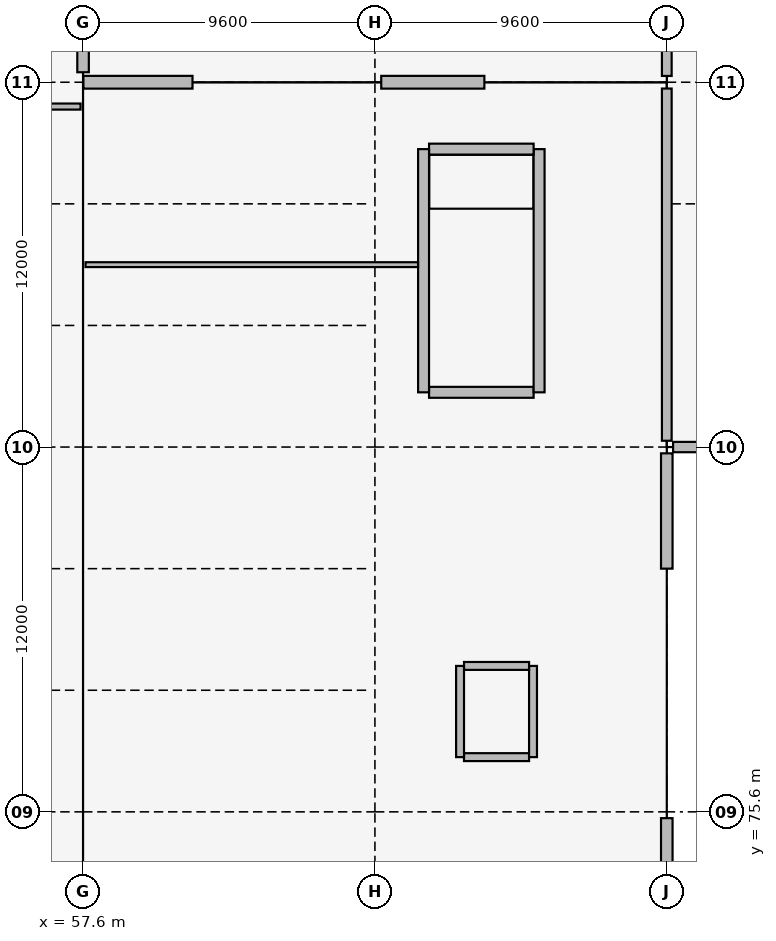
"""IFC4 building model, lengths in metres.
Left out: names, types, materials, properties, quantities, classifications, styles, units other than length and angle.
Written with IfcOpenShell. Run it as: python <this file> out.ifc"""

import sys

from ifc_helpers import new_model, si_unit, direction, frame, frame_2d, origin, origin_2d, place, context, subcontext, project, spatial, rectangle, hollow_circle, i_section, extrude, element, fill, save


model = new_model("IFC4")
c1 = context("Model", 3, precision=1e-05, world=origin(), true_north=direction((0.0, 1.0)))
c2 = subcontext(c1, "Body", "Model", "MODEL_VIEW")
j1 = project(units=[si_unit("LENGTHUNIT", "METRE"), si_unit("PLANEANGLEUNIT", "RADIAN")], contexts=[c1])
p1 = place(None, origin())
s1 = spatial("IfcSite", under=j1, at=p1, CompositionType="ELEMENT")
p2 = place(p1, origin())
s2 = spatial("IfcBuilding", under=s1, at=p2, CompositionType="ELEMENT")
p3 = place(p2, origin())
s3 = spatial("IfcBuildingStorey", under=s2, at=p3, CompositionType="ELEMENT", Elevation=0.0)
for number, where, z_axis, x_axis in (
    (1, (57.6, 75.6, 0.0), (0.0, 0.0, 1.0), (1.0, 0.0, 0.0)),
    (2, (57.6, 87.6, 0.0), (0.0, 0.0, 1.0), (1.0, 0.0, 0.0)),
    (3, (57.6, 99.6, 0.0), (0.0, 0.0, 1.0), (1.0, 0.0, 0.0)),
):
    element("IfcColumn", number, at=place(p3, frame(where, z_axis=z_axis, x_axis=x_axis)), inside=s3, PredefinedType="COLUMN", context=c2, shape_type="SweptSolid", body=[
        extrude(i_section(OverallWidth=0.3, OverallDepth=0.65, WebThickness=0.016, FlangeThickness=0.031, FilletRadius=0.027, at=origin_2d()), origin(), (0.0, 0.0, 1.0), 5.4),
    ])
for number, where, z_axis, x_axis in (
    (4, (67.2, 75.6, 0.0), (0.0, 0.0, 1.0), (1.0, 0.0, 0.0)),
    (5, (67.2, 87.6, 0.0), (0.0, 0.0, 1.0), (1.0, 0.0, 0.0)),
    (6, (67.2, 99.6, 0.0), (0.0, 0.0, 1.0), (1.0, 0.0, 0.0)),
    (7, (76.8, 75.6, 0.0), (0.0, 0.0, 1.0), (1.0, 0.0, 0.0)),
    (8, (76.8, 87.6, 0.0), (0.0, 0.0, 1.0), (1.0, 0.0, 0.0)),
    (9, (76.8, 99.6, 0.0), (0.0, 0.0, 1.0), (1.0, 0.0, 0.0)),
):
    element("IfcColumn", number, at=place(p3, frame(where, z_axis=z_axis, x_axis=x_axis)), inside=s3, PredefinedType="COLUMN", context=c2, shape_type="SweptSolid", body=[
        extrude(hollow_circle(Radius=0.203, WallThickness=0.016, at=origin_2d()), origin(), (0.0, 0.0, 1.0), 5.4),
    ])
p4 = place(p3, frame((72.42, 89.4, 0.0), z_axis=(0.0, 0.0, 1.0), x_axis=(-1.0, 0.0, 0.0)))
e10 = element("IfcWall", 10, at=p4, inside=s3, PredefinedType="SHEAR", context=c2, shape_type="SweptSolid", body=[
    extrude(rectangle(XDim=3.44, YDim=0.36, at=frame_2d((1.72, 0.0))), origin(), (0.0, 0.0, 1.0), 5.09),
])
p5 = place(p4, frame((0.95, 0.0, 0.0)))
e11 = element("IfcOpeningElement", 11, at=p5, cuts=e10, PredefinedType="OPENING", context=c2, shape_type="SweptSolid", body=[
    extrude(rectangle(XDim=1.0, YDim=2.15, at=frame_2d((0.5, 1.075))), frame((0.0, 0.19, 0.0), z_axis=(0.0, -1.0, 0.0), x_axis=(1.0, 0.0, 0.0)), (0.0, 0.0, 1.0), 0.38),
])
p6 = place(p3, frame((72.6, 89.4, 0.0), z_axis=(0.0, 0.0, 1.0), x_axis=(0.0, 1.0, 0.0)))
e12 = element("IfcWall", 12, at=p6, inside=s3, PredefinedType="SHEAR", context=c2, shape_type="SweptSolid", body=[
    extrude(rectangle(XDim=8.0, YDim=0.36, at=frame_2d((4.0, 0.0))), origin(), (0.0, 0.0, 1.0), 5.09),
])
p7 = place(p3, frame((72.42, 97.4, 0.0), z_axis=(0.0, 0.0, 1.0), x_axis=(-1.0, 0.0, 0.0)))
e13 = element("IfcWall", 13, at=p7, inside=s3, PredefinedType="SHEAR", context=c2, shape_type="SweptSolid", body=[
    extrude(rectangle(XDim=3.44, YDim=0.36, at=frame_2d((1.72, 0.0))), origin(), (0.0, 0.0, 1.0), 5.09),
])
p8 = place(p3, frame((68.8, 97.4, 0.0), z_axis=(0.0, 0.0, 1.0), x_axis=(0.0, -1.0, 0.0)))
e14 = element("IfcWall", 14, at=p8, inside=s3, PredefinedType="SHEAR", context=c2, shape_type="SweptSolid", body=[
    extrude(rectangle(XDim=8.0, YDim=0.36, at=frame_2d((4.0, 0.0))), origin(), (0.0, 0.0, 1.0), 5.09),
])
p9 = place(p3, frame((70.13, 77.4, 0.0), z_axis=(0.0, 0.0, 1.0), x_axis=(1.0, 0.0, 0.0)))
e15 = element("IfcWall", 15, at=p9, inside=s3, PredefinedType="SHEAR", context=c2, shape_type="SweptSolid", body=[
    extrude(rectangle(XDim=2.14, YDim=0.26, at=frame_2d((1.07, 0.0))), origin(), (0.0, 0.0, 1.0), 5.09),
])
p10 = place(p3, frame((72.4, 77.4, 0.0), z_axis=(0.0, 0.0, 1.0), x_axis=(0.0, 1.0, 0.0)))
e16 = element("IfcWall", 16, at=p10, inside=s3, PredefinedType="SHEAR", context=c2, shape_type="SweptSolid", body=[
    extrude(rectangle(XDim=3.0, YDim=0.26, at=frame_2d((1.5, 0.0))), origin(), (0.0, 0.0, 1.0), 5.09),
])
p11 = place(p3, frame((72.27, 80.4, 0.0), z_axis=(0.0, 0.0, 1.0), x_axis=(-1.0, 0.0, 0.0)))
e17 = element("IfcWall", 17, at=p11, inside=s3, PredefinedType="SHEAR", context=c2, shape_type="SweptSolid", body=[
    extrude(rectangle(XDim=2.14, YDim=0.26, at=frame_2d((1.07, 0.0))), origin(), (0.0, 0.0, 1.0), 5.09),
])
p12 = place(p3, frame((70.0, 80.4, 0.0), z_axis=(0.0, 0.0, 1.0), x_axis=(0.0, -1.0, 0.0)))
e18 = element("IfcWall", 18, at=p12, inside=s3, PredefinedType="SHEAR", context=c2, shape_type="SweptSolid", body=[
    extrude(rectangle(XDim=3.0, YDim=0.26, at=frame_2d((1.5, 0.0))), origin(), (0.0, 0.0, 1.0), 5.09),
])
p13 = place(p12, frame((0.95, 0.0, 0.0)))
e19 = element("IfcOpeningElement", 19, at=p13, cuts=e18, PredefinedType="OPENING", context=c2, shape_type="SweptSolid", body=[
    extrude(rectangle(XDim=1.1, YDim=2.1, at=frame_2d((0.55, 1.05))), frame((0.0, 0.14, 0.0), z_axis=(0.0, -1.0, 0.0), x_axis=(1.0, 0.0, 0.0)), (0.0, 0.0, 1.0), 0.28),
])
p14 = place(p3, frame((57.6, 111.271, 0.0), z_axis=(0.0, 0.0, 1.0), x_axis=(0.0, -1.0, 0.0)))
e20 = element("IfcWall", 20, at=p14, inside=s3, PredefinedType="STANDARD", context=c2, shape_type="SweptSolid", body=[
    extrude(rectangle(XDim=11.342, YDim=0.38, at=frame_2d((5.671, 0.0))), origin(), (0.0, 0.0, 1.0), 4.7),
])
p15 = place(p14, frame((0.45, 0.0, 1.2)))
e21 = element("IfcOpeningElement", 21, at=p15, cuts=e20, PredefinedType="OPENING", context=c2, shape_type="SweptSolid", body=[
    extrude(rectangle(XDim=1.65, YDim=1.75, at=frame_2d((0.825, 0.875))), frame((0.0, 0.2, 0.0), z_axis=(0.0, -1.0, 0.0), x_axis=(1.0, 0.0, 0.0)), (0.0, 0.0, 1.0), 0.4),
])
p16 = place(p14, frame((3.05, 0.0, 1.2)))
e22 = element("IfcOpeningElement", 22, at=p16, cuts=e20, PredefinedType="OPENING", context=c2, shape_type="SweptSolid", body=[
    extrude(rectangle(XDim=2.7, YDim=1.8, at=frame_2d((1.35, 0.9))), frame((0.0, 0.2, 0.0), z_axis=(0.0, -1.0, 0.0), x_axis=(1.0, 0.0, 0.0)), (0.0, 0.0, 1.0), 0.4),
])
p17 = place(p14, frame((6.6, 0.0, 1.2)))
e23 = element("IfcOpeningElement", 23, at=p17, cuts=e20, PredefinedType="OPENING", context=c2, shape_type="SweptSolid", body=[
    extrude(rectangle(XDim=1.35, YDim=1.75, at=frame_2d((0.675, 0.875))), frame((0.0, 0.2, 0.0), z_axis=(0.0, -1.0, 0.0), x_axis=(1.0, 0.0, 0.0)), (0.0, 0.0, 1.0), 0.4),
])
p18 = place(p3, frame((57.612, 99.6, 0.0), z_axis=(0.0, 0.0, 1.0), x_axis=(1.0, 0.0, 0.0)))
e24 = element("IfcWall", 24, at=p18, inside=s3, PredefinedType="STANDARD", context=c2, shape_type="SweptSolid", body=[
    extrude(rectangle(XDim=3.588, YDim=0.42, at=frame_2d((1.794, 0.0))), origin(), (0.0, 0.0, 1.0), 4.665),
])
p19 = place(p18, frame((0.45, 0.0, 0.0)))
e25 = element("IfcOpeningElement", 25, at=p19, cuts=e24, PredefinedType="OPENING", context=c2, shape_type="SweptSolid", body=[
    extrude(rectangle(XDim=2.2, YDim=2.4, at=frame_2d((1.1, 1.2))), frame((0.0, 0.22, 0.0), z_axis=(0.0, -1.0, 0.0), x_axis=(1.0, 0.0, 0.0)), (0.0, 0.0, 1.0), 0.44),
])
p20 = place(p3, frame((67.407, 99.6, 0.0), z_axis=(0.0, 0.0, 1.0), x_axis=(1.0, 0.0, 0.0)))
e26 = element("IfcWall", 26, at=p20, inside=s3, PredefinedType="STANDARD", context=c2, shape_type="SweptSolid", body=[
    extrude(rectangle(XDim=3.393, YDim=0.42, at=frame_2d((1.696, 0.0))), origin(), (0.0, 0.0, 1.0), 4.635),
])
p21 = place(p20, frame((0.45, 0.0, 0.0)))
e27 = element("IfcOpeningElement", 27, at=p21, cuts=e26, PredefinedType="OPENING", context=c2, shape_type="SweptSolid", body=[
    extrude(rectangle(XDim=2.2, YDim=2.4, at=frame_2d((1.1, 1.2))), frame((0.0, 0.22, 0.0), z_axis=(0.0, -1.0, 0.0), x_axis=(1.0, 0.0, 0.0)), (0.0, 0.0, 1.0), 0.44),
])
p22 = place(p3, frame((76.8, 75.393, 0.0), z_axis=(0.0, 0.0, 1.0), x_axis=(0.0, -1.0, 0.0)))
e28 = element("IfcWall", 28, at=p22, inside=s3, PredefinedType="STANDARD", context=c2, shape_type="SweptSolid", body=[
    extrude(rectangle(XDim=3.793, YDim=0.38, at=frame_2d((1.896, 0.0))), origin(), (0.0, 0.0, 1.0), 4.735),
])
p23 = place(p22, frame((0.7, 0.0, 0.0)))
e29 = element("IfcOpeningElement", 29, at=p23, cuts=e28, PredefinedType="OPENING", context=c2, shape_type="SweptSolid", body=[
    extrude(rectangle(XDim=2.0, YDim=2.3, at=frame_2d((1.0, 1.15))), frame((0.0, 0.2, 0.0), z_axis=(0.0, -1.0, 0.0), x_axis=(1.0, 0.0, 0.0)), (0.0, 0.0, 1.0), 0.4),
])
p24 = place(p3, frame((76.8, 87.393, 0.0), z_axis=(0.0, 0.0, 1.0), x_axis=(0.0, -1.0, 0.0)))
e30 = element("IfcWall", 30, at=p24, inside=s3, PredefinedType="STANDARD", context=c2, shape_type="SweptSolid", body=[
    extrude(rectangle(XDim=3.793, YDim=0.38, at=frame_2d((1.896, 0.0))), origin(), (0.0, 0.0, 1.0), 4.735),
])
p25 = place(p24, frame((0.7, 0.0, 0.0)))
e31 = element("IfcOpeningElement", 31, at=p25, cuts=e30, PredefinedType="OPENING", context=c2, shape_type="SweptSolid", body=[
    extrude(rectangle(XDim=2.0, YDim=2.3, at=frame_2d((1.0, 1.15))), frame((0.0, 0.2, 0.0), z_axis=(0.0, -1.0, 0.0), x_axis=(1.0, 0.0, 0.0)), (0.0, 0.0, 1.0), 0.4),
])
p26 = place(p3, frame((76.8, 87.807, 0.0), z_axis=(0.0, 0.0, 1.0), x_axis=(0.0, 1.0, 0.0)))
e32 = element("IfcWall", 32, at=p26, inside=s3, PredefinedType="STANDARD", context=c2, shape_type="SweptSolid", body=[
    extrude(rectangle(XDim=11.586, YDim=0.32, at=frame_2d((5.793, 0.0))), origin(), (0.0, 0.0, 1.0), 4.735),
])
p27 = place(p3, frame((76.8, 99.807, 0.0), z_axis=(0.0, 0.0, 1.0), x_axis=(0.0, 1.0, 0.0)))
e33 = element("IfcWall", 33, at=p27, inside=s3, PredefinedType="STANDARD", context=c2, shape_type="SweptSolid", body=[
    extrude(rectangle(XDim=11.586, YDim=0.32, at=frame_2d((5.793, 0.0))), origin(), (0.0, 0.0, 1.0), 5.935),
])
p28 = place(p27, frame((3.8, 0.0, 0.0)))
e34 = element("IfcOpeningElement", 34, at=p28, cuts=e33, PredefinedType="OPENING", context=c2, shape_type="SweptSolid", body=[
    extrude(rectangle(XDim=3.6, YDim=4.2, at=frame_2d((1.8, 2.1))), frame((0.0, 0.17, 0.0), z_axis=(0.0, -1.0, 0.0), x_axis=(1.0, 0.0, 0.0)), (0.0, 0.0, 1.0), 0.34),
])
p29 = place(p3, frame((88.79, 87.6, 0.0), z_axis=(0.0, 0.0, 1.0), x_axis=(-1.0, 0.0, 0.0)))
e35 = element("IfcWall", 35, at=p29, inside=s3, PredefinedType="STANDARD", context=c2, shape_type="SweptSolid", body=[
    extrude(rectangle(XDim=11.783, YDim=0.34, at=frame_2d((5.891, 0.0))), origin(), (0.0, 0.0, 1.0), 5.935),
])
p30 = place(p29, frame((3.2, 0.0, 0.0)))
e36 = element("IfcOpeningElement", 36, at=p30, cuts=e35, PredefinedType="OPENING", context=c2, shape_type="SweptSolid", body=[
    extrude(rectangle(XDim=1.8, YDim=2.3, at=frame_2d((0.9, 1.15))), frame((0.0, 0.18, 0.0), z_axis=(0.0, -1.0, 0.0), x_axis=(1.0, 0.0, 0.0)), (0.0, 0.0, 1.0), 0.36),
])
p31 = place(p3, frame((0.212, 98.8, 0.0), z_axis=(0.0, 0.0, 1.0), x_axis=(1.0, 0.0, 0.0)))
e37 = element("IfcWall", 37, at=p31, inside=s3, PredefinedType="PARTITIONING", context=c2, shape_type="SweptSolid", body=[
    extrude(rectangle(XDim=57.306, YDim=0.2, at=frame_2d((28.653, 0.0))), origin(), (0.0, 0.0, 1.0), 5.04),
])
p32 = place(p31, frame((13.5, 0.0, 0.0)))
e38 = element("IfcOpeningElement", 38, at=p32, cuts=e37, PredefinedType="OPENING", context=c2, shape_type="SweptSolid", body=[
    extrude(rectangle(XDim=1.6, YDim=2.2, at=frame_2d((0.8, 1.1))), frame((0.0, 0.11, 0.0), z_axis=(0.0, -1.0, 0.0), x_axis=(1.0, 0.0, 0.0)), (0.0, 0.0, 1.0), 0.22),
])
p33 = place(p31, frame((33.333, 0.0, 0.0)))
e39 = element("IfcOpeningElement", 39, at=p33, cuts=e37, PredefinedType="OPENING", context=c2, shape_type="SweptSolid", body=[
    extrude(rectangle(XDim=1.6, YDim=2.2, at=frame_2d((0.8, 1.1))), frame((0.0, 0.11, 0.0), z_axis=(0.0, -1.0, 0.0), x_axis=(1.0, 0.0, 0.0)), (0.0, 0.0, 1.0), 0.22),
])
p34 = place(p31, frame((44.267, 0.0, 0.0)))
e40 = element("IfcOpeningElement", 40, at=p34, cuts=e37, PredefinedType="OPENING", context=c2, shape_type="SweptSolid", body=[
    extrude(rectangle(XDim=1.02, YDim=2.12, at=frame_2d((0.51, 1.06))), frame((0.0, 0.11, 0.0), z_axis=(0.0, -1.0, 0.0), x_axis=(1.0, 0.0, 0.0)), (0.0, 0.0, 1.0), 0.22),
])
p35 = place(p31, frame((51.067, 0.0, 0.0)))
e41 = element("IfcOpeningElement", 41, at=p35, cuts=e37, PredefinedType="OPENING", context=c2, shape_type="SweptSolid", body=[
    extrude(rectangle(XDim=0.95, YDim=2.1, at=frame_2d((0.475, 1.05))), frame((0.0, 0.11, 0.0), z_axis=(0.0, -1.0, 0.0), x_axis=(1.0, 0.0, 0.0)), (0.0, 0.0, 1.0), 0.22),
])
p36 = place(p31, frame((54.0, 0.0, 0.0)))
e42 = element("IfcOpeningElement", 42, at=p36, cuts=e37, PredefinedType="OPENING", context=c2, shape_type="SweptSolid", body=[
    extrude(rectangle(XDim=1.0, YDim=2.1, at=frame_2d((0.5, 1.05))), frame((0.0, 0.11, 0.0), z_axis=(0.0, -1.0, 0.0), x_axis=(1.0, 0.0, 0.0)), (0.0, 0.0, 1.0), 0.22),
])
p37 = place(p3, frame((57.682, 93.6, 0.0), z_axis=(0.0, 0.0, 1.0), x_axis=(1.0, 0.0, 0.0)))
e43 = element("IfcWall", 43, at=p37, inside=s3, PredefinedType="PARTITIONING", context=c2, shape_type="SweptSolid", body=[
    extrude(rectangle(XDim=10.936, YDim=0.16, at=frame_2d((5.468, 0.0))), origin(), (0.0, 0.0, 1.0), 5.04),
])
p38 = place(p37, frame((3.5, 0.0, 0.0)))
e44 = element("IfcOpeningElement", 44, at=p38, cuts=e43, PredefinedType="OPENING", context=c2, shape_type="SweptSolid", body=[
    extrude(rectangle(XDim=1.7, YDim=2.2, at=frame_2d((0.85, 1.1))), frame((0.0, 0.09, 0.0), z_axis=(0.0, -1.0, 0.0), x_axis=(1.0, 0.0, 0.0)), (0.0, 0.0, 1.0), 0.18),
])
p39 = place(p19, origin())
e45 = element("IfcDoor", 45, at=p39, inside=s3, OperationType="DOUBLE_DOOR_SINGLE_SWING", PredefinedType="DOOR", context=c2, shape_type="SweptSolid", body=[
    extrude(rectangle(XDim=2.2, YDim=2.4, at=frame_2d((1.1, 1.2))), frame((0.0, 0.025, 0.0), z_axis=(0.0, -1.0, 0.0), x_axis=(1.0, 0.0, 0.0)), (0.0, 0.0, 1.0), 0.05),
])
fill(e25, e45)
p40 = place(p21, origin())
e46 = element("IfcDoor", 46, at=p40, inside=s3, OperationType="DOUBLE_DOOR_SINGLE_SWING", PredefinedType="DOOR", context=c2, shape_type="SweptSolid", body=[
    extrude(rectangle(XDim=2.2, YDim=2.4, at=frame_2d((1.1, 1.2))), frame((0.0, 0.025, 0.0), z_axis=(0.0, -1.0, 0.0), x_axis=(1.0, 0.0, 0.0)), (0.0, 0.0, 1.0), 0.05),
])
fill(e27, e46)
p41 = place(p23, origin())
e47 = element("IfcDoor", 47, at=p41, inside=s3, OperationType="DOUBLE_DOOR_SINGLE_SWING", PredefinedType="DOOR", context=c2, shape_type="SweptSolid", body=[
    extrude(rectangle(XDim=2.0, YDim=2.3, at=frame_2d((1.0, 1.15))), frame((0.0, 0.025, 0.0), z_axis=(0.0, -1.0, 0.0), x_axis=(1.0, 0.0, 0.0)), (0.0, 0.0, 1.0), 0.05),
])
fill(e29, e47)
p42 = place(p25, origin())
e48 = element("IfcDoor", 48, at=p42, inside=s3, OperationType="DOUBLE_DOOR_SINGLE_SWING", PredefinedType="DOOR", context=c2, shape_type="SweptSolid", body=[
    extrude(rectangle(XDim=2.0, YDim=2.3, at=frame_2d((1.0, 1.15))), frame((0.0, 0.025, 0.0), z_axis=(0.0, -1.0, 0.0), x_axis=(1.0, 0.0, 0.0)), (0.0, 0.0, 1.0), 0.05),
])
fill(e31, e48)
p43 = place(p38, origin())
e49 = element("IfcDoor", 49, at=p43, inside=s3, OperationType="DOUBLE_DOOR_SINGLE_SWING", PredefinedType="DOOR", context=c2, shape_type="SweptSolid", body=[
    extrude(rectangle(XDim=1.7, YDim=2.2, at=frame_2d((0.85, 1.1))), frame((0.0, 0.025, 0.0), z_axis=(0.0, -1.0, 0.0), x_axis=(1.0, 0.0, 0.0)), (0.0, 0.0, 1.0), 0.05),
])
fill(e44, e49)
p44 = place(p5, origin())
e50 = element("IfcDoor", 50, at=p44, inside=s3, OperationType="SINGLE_SWING_LEFT", PredefinedType="DOOR", context=c2, shape_type="SweptSolid", body=[
    extrude(rectangle(XDim=1.0, YDim=2.15, at=frame_2d((0.5, 1.075))), frame((0.0, 0.025, 0.0), z_axis=(0.0, -1.0, 0.0), x_axis=(1.0, 0.0, 0.0)), (0.0, 0.0, 1.0), 0.05),
])
fill(e11, e50)
p45 = place(p13, origin())
e51 = element("IfcDoor", 51, at=p45, inside=s3, OperationType="SLIDING_TO_LEFT", PredefinedType="DOOR", context=c2, shape_type="SweptSolid", body=[
    extrude(rectangle(XDim=1.1, YDim=2.1, at=frame_2d((0.55, 1.05))), frame((0.0, 0.025, 0.0), z_axis=(0.0, -1.0, 0.0), x_axis=(1.0, 0.0, 0.0)), (0.0, 0.0, 1.0), 0.05),
])
fill(e19, e51)
save(model, sys.argv[1])
